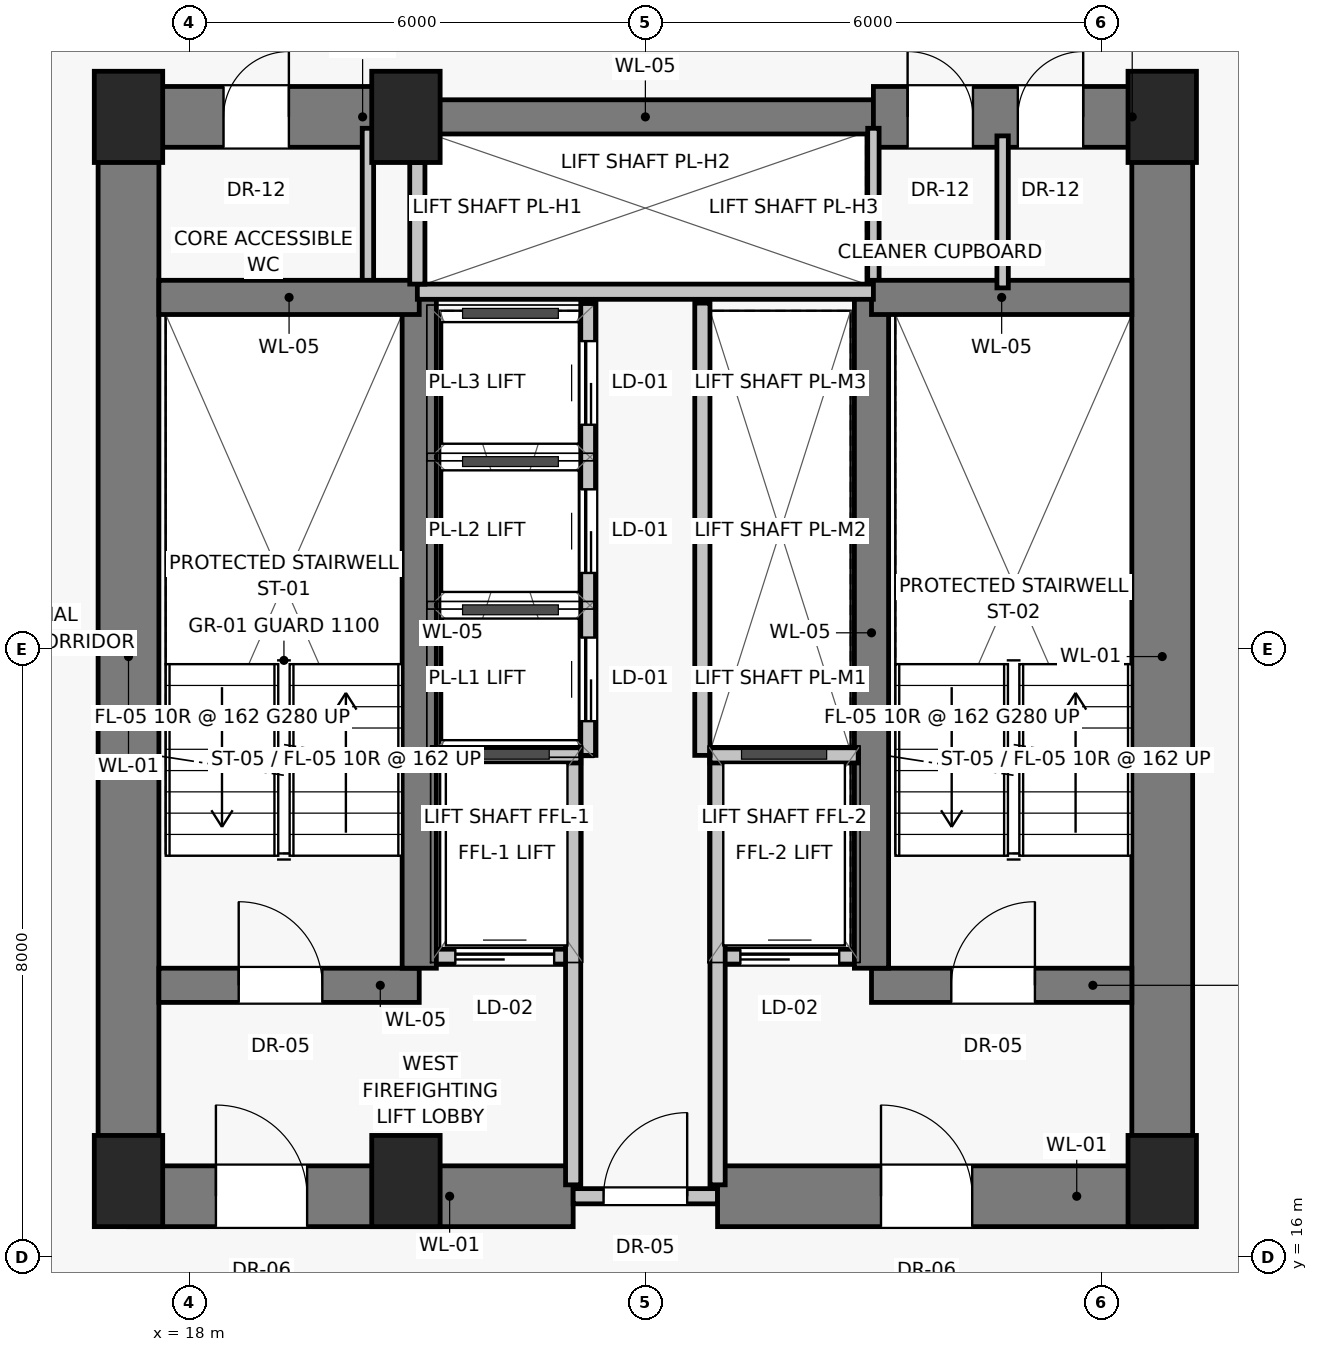
"""IFC4 building model, lengths in metres.
Left out: names, types, materials, properties, quantities, classifications, styles, units other than length and angle.
Written with IfcOpenShell. Run it as: python <this file> out.ifc"""

import sys

from ifc_helpers import new_model, si_unit, direction, frame, frame_2d, origin, origin_2d, place, context, subcontext, project, spatial, rectangle, extrude, source, transform, mapped, element, fill, save


model = new_model("IFC4")
c1 = context("Model", 3, precision=1e-05, world=origin(), true_north=direction((0.0, 1.0)))
c2 = subcontext(c1, "Body", "Model", "MODEL_VIEW")
j1 = project(units=[si_unit("LENGTHUNIT", "METRE"), si_unit("PLANEANGLEUNIT", "RADIAN")], contexts=[c1])
p1 = place(None, origin())
s1 = spatial("IfcSite", under=j1, at=p1, CompositionType="ELEMENT")
p2 = place(p1, origin())
s2 = spatial("IfcBuilding", under=s1, at=p2, CompositionType="ELEMENT")
p3 = place(p2, frame((0.0, 0.0, 27.3)))
s3 = spatial("IfcBuildingStorey", under=s2, at=p3, CompositionType="ELEMENT", Elevation=27.3)
for number, where, z_axis, x_axis in (
    (1, (17.2, 17.0, 0.0), (0.0, 0.0, 1.0), (1.0, 0.0, 0.0)),
    (2, (20.85, 17.0, 0.0), (0.0, 0.0, 1.0), (1.0, 0.0, 0.0)),
    (3, (30.8, 17.0, 0.0), (0.0, 0.0, 1.0), (1.0, 0.0, 0.0)),
    (4, (17.2, 31.0, 0.0), (0.0, 0.0, 1.0), (1.0, 0.0, 0.0)),
    (5, (20.85, 31.0, 0.0), (0.0, 0.0, 1.0), (1.0, 0.0, 0.0)),
    (6, (30.8, 31.0, 0.0), (0.0, 0.0, 1.0), (1.0, 0.0, 0.0)),
):
    element("IfcColumn", number, at=place(p3, frame(where, z_axis=z_axis, x_axis=x_axis)), inside=s3, PredefinedType="PILASTER", context=c2, shape_type="SweptSolid", body=[
        extrude(rectangle(XDim=0.9, YDim=1.2, at=origin_2d()), origin(), (0.0, 0.0, 1.0), 3.25),
    ])
for number, where, z_axis, x_axis in (
    (7, (17.2, 16.8, 0.0), (0.0, 0.0, 1.0), (0.0, 1.0, 0.0)),
    (8, (30.8, 16.8, 0.0), (0.0, 0.0, 1.0), (0.0, 1.0, 0.0)),
):
    element("IfcWall", number, at=place(p3, frame(where, z_axis=z_axis, x_axis=x_axis)), inside=s3, PredefinedType="SHEAR", context=c2, shape_type="SweptSolid", body=[
        extrude(rectangle(XDim=14.2, YDim=0.8, at=frame_2d((7.1, 0.0))), origin(), (0.0, 0.0, 1.0), 3.0),
    ])
p4 = place(p3, frame((17.2, 16.8, 0.0), z_axis=(0.0, 0.0, 1.0), x_axis=(1.0, 0.0, 0.0)))
e9 = element("IfcWall", 9, at=p4, inside=s3, PredefinedType="SHEAR", context=c2, shape_type="SweptSolid", body=[
    extrude(rectangle(XDim=5.85, YDim=0.8, at=frame_2d((2.925, 0.0))), origin(), (0.0, 0.0, 1.0), 3.0),
])
p5 = place(p4, frame((1.15, 0.0, 0.0)))
e10 = element("IfcOpeningElement", 10, at=p5, cuts=e9, PredefinedType="OPENING", context=c2, shape_type="SweptSolid", body=[
    extrude(rectangle(XDim=1.2, YDim=2.03, at=frame_2d((0.6, 1.015))), frame((0.0, 0.41, 0.0), z_axis=(0.0, -1.0, 0.0), x_axis=(1.0, 0.0, 0.0)), (0.0, 0.0, 1.0), 0.82),
])
p6 = place(p3, frame((23.05, 16.8, 0.0), z_axis=(0.0, 0.0, 1.0), x_axis=(1.0, 0.0, 0.0)))
e11 = element("IfcWall", 11, at=p6, inside=s3, PredefinedType="SOLIDWALL", context=c2, shape_type="SweptSolid", body=[
    extrude(rectangle(XDim=1.9, YDim=0.2, at=frame_2d((0.95, 0.0))), origin(), (0.0, 0.0, 1.0), 2.15),
])
p7 = place(p6, frame((0.4, 0.0, 0.0)))
e12 = element("IfcOpeningElement", 12, at=p7, cuts=e11, PredefinedType="OPENING", context=c2, shape_type="SweptSolid", body=[
    extrude(rectangle(XDim=1.1, YDim=2.03, at=frame_2d((0.55, 1.015))), frame((0.0, 0.11, 0.0), z_axis=(0.0, -1.0, 0.0), x_axis=(1.0, 0.0, 0.0)), (0.0, 0.0, 1.0), 0.22),
])
p8 = place(p3, frame((24.95, 16.8, 0.0), z_axis=(0.0, 0.0, 1.0), x_axis=(1.0, 0.0, 0.0)))
e13 = element("IfcWall", 13, at=p8, inside=s3, PredefinedType="SHEAR", context=c2, shape_type="SweptSolid", body=[
    extrude(rectangle(XDim=5.85, YDim=0.8, at=frame_2d((2.925, 0.0))), origin(), (0.0, 0.0, 1.0), 3.0),
])
p9 = place(p8, frame((2.15, 0.0, 0.0)))
e14 = element("IfcOpeningElement", 14, at=p9, cuts=e13, PredefinedType="OPENING", context=c2, shape_type="SweptSolid", body=[
    extrude(rectangle(XDim=1.2, YDim=2.03, at=frame_2d((0.6, 1.015))), frame((0.0, 0.41, 0.0), z_axis=(0.0, -1.0, 0.0), x_axis=(1.0, 0.0, 0.0)), (0.0, 0.0, 1.0), 0.82),
])
p10 = place(p3, frame((17.2, 31.0, 0.0), z_axis=(0.0, 0.0, 1.0), x_axis=(1.0, 0.0, 0.0)))
e15 = element("IfcWall", 15, at=p10, inside=s3, PredefinedType="SHEAR", context=c2, shape_type="SweptSolid", body=[
    extrude(rectangle(XDim=3.8, YDim=0.8, at=frame_2d((1.9, 0.0))), origin(), (0.0, 0.0, 1.0), 3.0),
])
p11 = place(p10, frame((1.25, 0.0, 0.0)))
e16 = element("IfcOpeningElement", 16, at=p11, cuts=e15, PredefinedType="OPENING", context=c2, shape_type="SweptSolid", body=[
    extrude(rectangle(XDim=0.86, YDim=2.01, at=frame_2d((0.43, 1.005))), frame((0.0, 0.41, 0.0), z_axis=(0.0, -1.0, 0.0), x_axis=(1.0, 0.0, 0.0)), (0.0, 0.0, 1.0), 0.82),
])
p12 = place(p3, frame((21.0, 31.0, 0.0), z_axis=(0.0, 0.0, 1.0), x_axis=(1.0, 0.0, 0.0)))
e17 = element("IfcWall", 17, at=p12, inside=s3, PredefinedType="SHEAR", context=c2, shape_type="SweptSolid", body=[
    extrude(rectangle(XDim=6.0, YDim=0.45, at=frame_2d((3.0, 0.0))), origin(), (0.0, 0.0, 1.0), 3.0),
])
p13 = place(p3, frame((27.0, 31.0, 0.0), z_axis=(0.0, 0.0, 1.0), x_axis=(1.0, 0.0, 0.0)))
e18 = element("IfcWall", 18, at=p13, inside=s3, PredefinedType="SHEAR", context=c2, shape_type="SweptSolid", body=[
    extrude(rectangle(XDim=3.8, YDim=0.8, at=frame_2d((1.9, 0.0))), origin(), (0.0, 0.0, 1.0), 3.0),
])
p14 = place(p13, frame((0.45, 0.0, 0.0)))
e19 = element("IfcOpeningElement", 19, at=p14, cuts=e18, PredefinedType="OPENING", context=c2, shape_type="SweptSolid", body=[
    extrude(rectangle(XDim=0.86, YDim=2.01, at=frame_2d((0.43, 1.005))), frame((0.0, 0.41, 0.0), z_axis=(0.0, -1.0, 0.0), x_axis=(1.0, 0.0, 0.0)), (0.0, 0.0, 1.0), 0.82),
])
p15 = place(p13, frame((1.9, 0.0, 0.0)))
e20 = element("IfcOpeningElement", 20, at=p15, cuts=e18, PredefinedType="OPENING", context=c2, shape_type="SweptSolid", body=[
    extrude(rectangle(XDim=0.86, YDim=2.01, at=frame_2d((0.43, 1.005))), frame((0.0, 0.41, 0.0), z_axis=(0.0, -1.0, 0.0), x_axis=(1.0, 0.0, 0.0)), (0.0, 0.0, 1.0), 0.82),
])
for number, where, z_axis, x_axis in (
    (21, (20.35, 28.65, 0.0), (0.0, 0.0, 1.0), (0.0, 1.0, 0.0)),
    (22, (27.0, 28.65, 0.0), (0.0, 0.0, 1.0), (0.0, 1.0, 0.0)),
):
    element("IfcWall", number, at=place(p3, frame(where, z_axis=z_axis, x_axis=x_axis)), inside=s3, PredefinedType="PARTITIONING", context=c2, shape_type="SweptSolid", body=[
        extrude(rectangle(XDim=2.2, YDim=0.15, at=frame_2d((1.1, 0.0))), origin(), (0.0, 0.0, 1.0), 3.0),
    ])
p16 = place(p3, frame((17.6, 19.575, 0.0), z_axis=(0.0, 0.0, 1.0), x_axis=(1.0, 0.0, 0.0)))
e23 = element("IfcWall", 23, at=p16, inside=s3, PredefinedType="SHEAR", context=c2, shape_type="SweptSolid", body=[
    extrude(rectangle(XDim=3.425, YDim=0.45, at=frame_2d((1.712, 0.0))), origin(), (0.0, 0.0, 1.0), 3.0),
])
p17 = place(p16, frame((1.05, 0.0, 0.0)))
e24 = element("IfcOpeningElement", 24, at=p17, cuts=e23, PredefinedType="OPENING", context=c2, shape_type="SweptSolid", body=[
    extrude(rectangle(XDim=1.1, YDim=2.03, at=frame_2d((0.55, 1.015))), frame((0.0, 0.235, 0.0), z_axis=(0.0, -1.0, 0.0), x_axis=(1.0, 0.0, 0.0)), (0.0, 0.0, 1.0), 0.47),
])
p18 = place(p3, frame((21.2, 19.95, 0.0), z_axis=(0.0, 0.0, 1.0), x_axis=(1.0, 0.0, 0.0)))
e25 = element("IfcWall", 25, at=p18, inside=s3, PredefinedType="SOLIDWALL", context=c2, shape_type="SweptSolid", body=[
    extrude(rectangle(XDim=1.85, YDim=0.2, at=frame_2d((0.925, 0.0))), origin(), (0.0, 0.0, 1.0), 3.0),
])
p19 = place(p18, frame((0.3, 0.0, 0.0)))
e26 = element("IfcOpeningElement", 26, at=p19, cuts=e25, PredefinedType="OPENING", context=c2, shape_type="SweptSolid", body=[
    extrude(rectangle(XDim=1.3, YDim=2.25, at=frame_2d((0.65, 1.125))), frame((0.0, 0.11, 0.0), z_axis=(0.0, -1.0, 0.0), x_axis=(1.0, 0.0, 0.0)), (0.0, 0.0, 1.0), 0.22),
])
p20 = place(p3, frame((24.95, 19.95, 0.0), z_axis=(0.0, 0.0, 1.0), x_axis=(1.0, 0.0, 0.0)))
e27 = element("IfcWall", 27, at=p20, inside=s3, PredefinedType="SOLIDWALL", context=c2, shape_type="SweptSolid", body=[
    extrude(rectangle(XDim=1.85, YDim=0.2, at=frame_2d((0.925, 0.0))), origin(), (0.0, 0.0, 1.0), 3.0),
])
p21 = place(p20, frame((0.3, 0.0, 0.0)))
e28 = element("IfcOpeningElement", 28, at=p21, cuts=e27, PredefinedType="OPENING", context=c2, shape_type="SweptSolid", body=[
    extrude(rectangle(XDim=1.3, YDim=2.25, at=frame_2d((0.65, 1.125))), frame((0.0, 0.11, 0.0), z_axis=(0.0, -1.0, 0.0), x_axis=(1.0, 0.0, 0.0)), (0.0, 0.0, 1.0), 0.22),
])
p22 = place(p3, frame((26.975, 19.575, 0.0), z_axis=(0.0, 0.0, 1.0), x_axis=(1.0, 0.0, 0.0)))
e29 = element("IfcWall", 29, at=p22, inside=s3, PredefinedType="SHEAR", context=c2, shape_type="SweptSolid", body=[
    extrude(rectangle(XDim=3.425, YDim=0.45, at=frame_2d((1.712, 0.0))), origin(), (0.0, 0.0, 1.0), 3.0),
])
p23 = place(p22, frame((1.05, 0.0, 0.0)))
e30 = element("IfcOpeningElement", 30, at=p23, cuts=e29, PredefinedType="OPENING", context=c2, shape_type="SweptSolid", body=[
    extrude(rectangle(XDim=1.1, YDim=2.03, at=frame_2d((0.55, 1.015))), frame((0.0, 0.235, 0.0), z_axis=(0.0, -1.0, 0.0), x_axis=(1.0, 0.0, 0.0)), (0.0, 0.0, 1.0), 0.47),
])
for number, where, z_axis, x_axis in (
    (31, (21.025, 19.8, 0.0), (0.0, 0.0, 1.0), (0.0, 1.0, 0.0)),
    (32, (26.975, 19.8, 0.0), (0.0, 0.0, 1.0), (0.0, 1.0, 0.0)),
):
    element("IfcWall", number, at=place(p3, frame(where, z_axis=z_axis, x_axis=x_axis)), inside=s3, PredefinedType="SHEAR", context=c2, shape_type="SweptSolid", body=[
        extrude(rectangle(XDim=8.825, YDim=0.45, at=frame_2d((4.413, 0.0))), origin(), (0.0, 0.0, 1.0), 3.0),
    ])
for number, where, z_axis, x_axis in (
    (33, (17.6, 28.625, 0.0), (0.0, 0.0, 1.0), (1.0, 0.0, 0.0)),
    (34, (26.975, 28.625, 0.0), (0.0, 0.0, 1.0), (1.0, 0.0, 0.0)),
):
    element("IfcWall", number, at=place(p3, frame(where, z_axis=z_axis, x_axis=x_axis)), inside=s3, PredefinedType="SHEAR", context=c2, shape_type="SweptSolid", body=[
        extrude(rectangle(XDim=3.425, YDim=0.45, at=frame_2d((1.712, 0.0))), origin(), (0.0, 0.0, 1.0), 3.0),
    ])
for number, where, z_axis, x_axis in (
    (35, (23.05, 16.95, 0.0), (0.0, 0.0, 1.0), (0.0, 1.0, 0.0)),
    (36, (24.95, 16.95, 0.0), (0.0, 0.0, 1.0), (0.0, 1.0, 0.0)),
):
    element("IfcWall", number, at=place(p3, frame(where, z_axis=z_axis, x_axis=x_axis)), inside=s3, PredefinedType="SOLIDWALL", context=c2, shape_type="SweptSolid", body=[
        extrude(rectangle(XDim=5.6, YDim=0.2, at=frame_2d((2.8, 0.0))), origin(), (0.0, 0.0, 1.0), 3.0),
    ])
for number, where, z_axis, x_axis in (
    (37, (21.2, 22.6, 0.0), (0.0, 0.0, 1.0), (1.0, 0.0, 0.0)),
    (38, (24.85, 22.6, 0.0), (0.0, 0.0, 1.0), (1.0, 0.0, 0.0)),
):
    element("IfcWall", number, at=place(p3, frame(where, z_axis=z_axis, x_axis=x_axis)), inside=s3, PredefinedType="SOLIDWALL", context=c2, shape_type="SweptSolid", body=[
        extrude(rectangle(XDim=1.95, YDim=0.2, at=frame_2d((0.975, 0.0))), origin(), (0.0, 0.0, 1.0), 3.0),
    ])
p24 = place(p3, frame((21.0, 28.7, 0.0), z_axis=(0.0, 0.0, 1.0), x_axis=(1.0, 0.0, 0.0)))
e39 = element("IfcWall", 39, at=p24, inside=s3, PredefinedType="SOLIDWALL", context=c2, shape_type="SweptSolid", body=[
    extrude(rectangle(XDim=6.0, YDim=0.2, at=frame_2d((3.0, 0.0))), origin(), (0.0, 0.0, 1.0), 3.0),
])
p25 = place(p3, frame((21.0, 28.8, 0.0), z_axis=(0.0, 0.0, 1.0), x_axis=(0.0, 1.0, 0.0)))
e40 = element("IfcWall", 40, at=p25, inside=s3, PredefinedType="SOLIDWALL", context=c2, shape_type="SweptSolid", body=[
    extrude(rectangle(XDim=1.6, YDim=0.2, at=frame_2d((0.8, 0.0))), origin(), (0.0, 0.0, 1.0), 3.0),
])
p26 = place(p3, frame((23.25, 22.6, 0.0), z_axis=(0.0, 0.0, 1.0), x_axis=(0.0, 1.0, 0.0)))
e41 = element("IfcWall", 41, at=p26, inside=s3, PredefinedType="SOLIDWALL", context=c2, shape_type="SweptSolid", body=[
    extrude(rectangle(XDim=5.95, YDim=0.2, at=frame_2d((2.975, 0.0))), origin(), (0.0, 0.0, 1.0), 3.0),
])
p27 = place(p26, frame((0.45, 0.0, 0.0)))
e42 = element("IfcOpeningElement", 42, at=p27, cuts=e41, PredefinedType="OPENING", context=c2, shape_type="SweptSolid", body=[
    extrude(rectangle(XDim=1.1, YDim=2.08, at=frame_2d((0.55, 1.04))), frame((0.0, 0.11, 0.0), z_axis=(0.0, -1.0, 0.0), x_axis=(1.0, 0.0, 0.0)), (0.0, 0.0, 1.0), 0.22),
])
p28 = place(p26, frame((2.4, 0.0, 0.0)))
e43 = element("IfcOpeningElement", 43, at=p28, cuts=e41, PredefinedType="OPENING", context=c2, shape_type="SweptSolid", body=[
    extrude(rectangle(XDim=1.1, YDim=2.08, at=frame_2d((0.55, 1.04))), frame((0.0, 0.11, 0.0), z_axis=(0.0, -1.0, 0.0), x_axis=(1.0, 0.0, 0.0)), (0.0, 0.0, 1.0), 0.22),
])
p29 = place(p26, frame((4.35, 0.0, 0.0)))
e44 = element("IfcOpeningElement", 44, at=p29, cuts=e41, PredefinedType="OPENING", context=c2, shape_type="SweptSolid", body=[
    extrude(rectangle(XDim=1.1, YDim=2.08, at=frame_2d((0.55, 1.04))), frame((0.0, 0.11, 0.0), z_axis=(0.0, -1.0, 0.0), x_axis=(1.0, 0.0, 0.0)), (0.0, 0.0, 1.0), 0.22),
])
p30 = place(p3, frame((24.75, 22.6, 0.0), z_axis=(0.0, 0.0, 1.0), x_axis=(0.0, 1.0, 0.0)))
e45 = element("IfcWall", 45, at=p30, inside=s3, PredefinedType="SOLIDWALL", context=c2, shape_type="SweptSolid", body=[
    extrude(rectangle(XDim=5.95, YDim=0.2, at=frame_2d((2.975, 0.0))), origin(), (0.0, 0.0, 1.0), 3.0),
])
p31 = place(p3, frame((28.7, 28.75, 0.0), z_axis=(0.0, 0.0, 1.0), x_axis=(0.0, 1.0, 0.0)))
e46 = element("IfcWall", 46, at=p31, inside=s3, PredefinedType="PARTITIONING", context=c2, shape_type="SweptSolid", body=[
    extrude(rectangle(XDim=2.0, YDim=0.15, at=frame_2d((1.0, 0.0))), origin(), (0.0, 0.0, 1.0), 3.0),
])
m1 = source(origin(), c2, "Body", "SweptSolid", [
    extrude(rectangle(XDim=1.2, YDim=2.03, at=frame_2d((0.6, 1.015))), frame((0.0, 0.025, 0.0), z_axis=(0.0, -1.0, 0.0), x_axis=(1.0, 0.0, 0.0)), (0.0, 0.0, 1.0), 0.05),
])
p32 = place(p5, origin())
e47 = element("IfcDoor", 47, at=p32, inside=s3, OperationType="SINGLE_SWING_LEFT", PredefinedType="DOOR", context=c2, shape_type="MappedRepresentation", body=[
    mapped(m1, transform((0.0, 0.0, 0.0), scale=1.0)),
])
fill(e10, e47)
m2 = source(origin(), c2, "Body", "SweptSolid", [
    extrude(rectangle(XDim=1.1, YDim=2.03, at=frame_2d((0.55, 1.015))), frame((0.0, 0.025, 0.0), z_axis=(0.0, -1.0, 0.0), x_axis=(1.0, 0.0, 0.0)), (0.0, 0.0, 1.0), 0.05),
])
p33 = place(p7, origin())
e48 = element("IfcDoor", 48, at=p33, inside=s3, OperationType="SINGLE_SWING_RIGHT", PredefinedType="DOOR", context=c2, shape_type="MappedRepresentation", body=[
    mapped(m2, transform((0.0, 0.0, 0.0), scale=1.0)),
])
fill(e12, e48)
p34 = place(p9, origin())
e49 = element("IfcDoor", 49, at=p34, inside=s3, OperationType="SINGLE_SWING_LEFT", PredefinedType="DOOR", context=c2, shape_type="MappedRepresentation", body=[
    mapped(m1, transform((0.0, 0.0, 0.0), scale=1.0)),
])
fill(e14, e49)
m3 = source(origin(), c2, "Body", "SweptSolid", [
    extrude(rectangle(XDim=0.86, YDim=2.01, at=frame_2d((0.43, 1.005))), frame((0.0, 0.025, 0.0), z_axis=(0.0, -1.0, 0.0), x_axis=(1.0, 0.0, 0.0)), (0.0, 0.0, 1.0), 0.05),
])
p35 = place(p11, origin())
e50 = element("IfcDoor", 50, at=p35, inside=s3, OperationType="SINGLE_SWING_RIGHT", PredefinedType="DOOR", context=c2, shape_type="MappedRepresentation", body=[
    mapped(m3, transform((0.0, 0.0, 0.0), scale=1.0)),
])
fill(e16, e50)
p36 = place(p14, origin())
e51 = element("IfcDoor", 51, at=p36, inside=s3, OperationType="SINGLE_SWING_LEFT", PredefinedType="DOOR", context=c2, shape_type="MappedRepresentation", body=[
    mapped(m3, transform((0.0, 0.0, 0.0), scale=1.0)),
])
fill(e19, e51)
p37 = place(p15, origin())
e52 = element("IfcDoor", 52, at=p37, inside=s3, OperationType="SINGLE_SWING_RIGHT", PredefinedType="DOOR", context=c2, shape_type="MappedRepresentation", body=[
    mapped(m3, transform((0.0, 0.0, 0.0), scale=1.0)),
])
fill(e20, e52)
p38 = place(p17, origin())
e53 = element("IfcDoor", 53, at=p38, inside=s3, OperationType="SINGLE_SWING_LEFT", PredefinedType="DOOR", context=c2, shape_type="MappedRepresentation", body=[
    mapped(m2, transform((0.0, 0.0, 0.0), scale=1.0)),
])
fill(e24, e53)
m4 = source(origin(), c2, "Body", "SweptSolid", [
    extrude(rectangle(XDim=1.3, YDim=2.25, at=frame_2d((0.65, 1.125))), frame((0.0, 0.025, 0.0), z_axis=(0.0, -1.0, 0.0), x_axis=(1.0, 0.0, 0.0)), (0.0, 0.0, 1.0), 0.05),
])
p39 = place(p19, origin())
e54 = element("IfcDoor", 54, at=p39, inside=s3, OperationType="SLIDING_TO_LEFT", PredefinedType="DOOR", context=c2, shape_type="MappedRepresentation", body=[
    mapped(m4, transform((0.0, 0.0, 0.0), scale=1.0)),
])
fill(e26, e54)
p40 = place(p21, origin())
e55 = element("IfcDoor", 55, at=p40, inside=s3, OperationType="SLIDING_TO_LEFT", PredefinedType="DOOR", context=c2, shape_type="MappedRepresentation", body=[
    mapped(m4, transform((0.0, 0.0, 0.0), scale=1.0)),
])
fill(e28, e55)
p41 = place(p23, origin())
e56 = element("IfcDoor", 56, at=p41, inside=s3, OperationType="SINGLE_SWING_RIGHT", PredefinedType="DOOR", context=c2, shape_type="MappedRepresentation", body=[
    mapped(m2, transform((0.0, 0.0, 0.0), scale=1.0)),
])
fill(e30, e56)
m5 = source(origin(), c2, "Body", "SweptSolid", [
    extrude(rectangle(XDim=1.1, YDim=2.08, at=frame_2d((0.55, 1.04))), frame((0.0, 0.025, 0.0), z_axis=(0.0, -1.0, 0.0), x_axis=(1.0, 0.0, 0.0)), (0.0, 0.0, 1.0), 0.05),
])
p42 = place(p27, origin())
e57 = element("IfcDoor", 57, at=p42, inside=s3, OperationType="SLIDING_TO_LEFT", PredefinedType="DOOR", context=c2, shape_type="MappedRepresentation", body=[
    mapped(m5, transform((0.0, 0.0, 0.0), scale=1.0)),
])
fill(e42, e57)
p43 = place(p28, origin())
e58 = element("IfcDoor", 58, at=p43, inside=s3, OperationType="SLIDING_TO_LEFT", PredefinedType="DOOR", context=c2, shape_type="MappedRepresentation", body=[
    mapped(m5, transform((0.0, 0.0, 0.0), scale=1.0)),
])
fill(e43, e58)
p44 = place(p29, origin())
e59 = element("IfcDoor", 59, at=p44, inside=s3, OperationType="SLIDING_TO_LEFT", PredefinedType="DOOR", context=c2, shape_type="MappedRepresentation", body=[
    mapped(m5, transform((0.0, 0.0, 0.0), scale=1.0)),
])
fill(e44, e59)
save(model, sys.argv[1])
